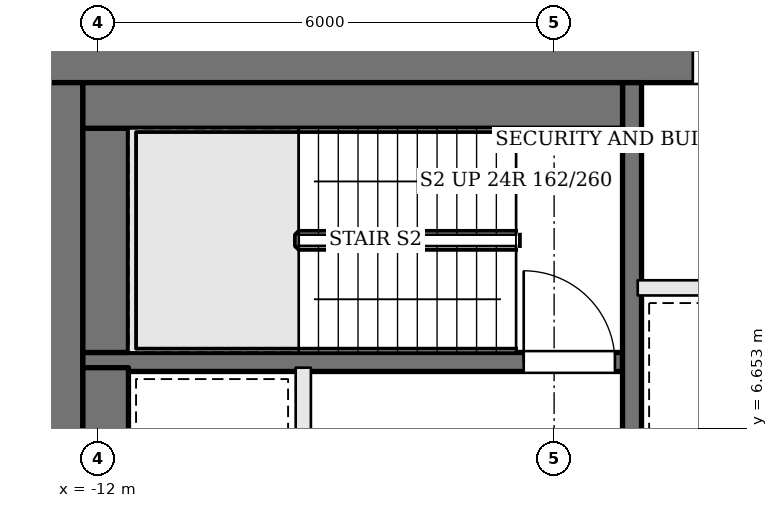
"""IFC4 building model, lengths in metres.
Left out: names, types, materials, properties, quantities, classifications, styles, units other than length and angle.
Written with IfcOpenShell. Run it as: python <this file> out.ifc"""

import sys

from ifc_helpers import new_model, si_unit, direction, frame, frame_2d, origin, place, context, subcontext, project, spatial, rectangle, extrude, element, fill, save


model = new_model("IFC4")
c1 = context("Model", 3, precision=1e-05, world=origin(), true_north=direction((0.0, 1.0)))
c2 = subcontext(c1, "Body", "Model", "MODEL_VIEW")
j1 = project(units=[si_unit("LENGTHUNIT", "METRE"), si_unit("PLANEANGLEUNIT", "RADIAN")], contexts=[c1])
p1 = place(None, origin())
s1 = spatial("IfcSite", under=j1, at=p1, CompositionType="ELEMENT")
p2 = place(p1, origin())
s2 = spatial("IfcBuilding", under=s1, at=p2, CompositionType="ELEMENT")
p3 = place(p2, frame((0.0, 0.0, 256.5)))
s3 = spatial("IfcBuildingStorey", under=s2, at=p3, CompositionType="ELEMENT", Elevation=256.5)
p4 = place(p3, frame((-13.0, 11.6, 0.0), z_axis=(0.0, 0.0, 1.0), x_axis=(1.0, 0.0, 0.0)))
e1 = element("IfcWall", 1, at=p4, inside=s3, PredefinedType="SHEAR", context=c2, shape_type="SweptSolid", body=[
    extrude(rectangle(XDim=26.0, YDim=0.8, at=frame_2d((13.0, 0.0))), origin(), (0.0, 0.0, 1.0), 3.9),
])
p5 = place(p4, frame((8.825, 0.0, 0.0)))
e2 = element("IfcOpeningElement", 2, at=p5, cuts=e1, PredefinedType="OPENING", context=c2, shape_type="SweptSolid", body=[
    extrude(rectangle(XDim=1.0, YDim=2.1, at=frame_2d((0.5, 1.05))), frame((0.0, 0.41, 0.0), z_axis=(0.0, -1.0, 0.0), x_axis=(1.0, 0.0, 0.0)), (0.0, 0.0, 1.0), 0.82),
])
p6 = place(p4, frame((11.825, 0.0, 0.0)))
e3 = element("IfcOpeningElement", 3, at=p6, cuts=e1, PredefinedType="OPENING", context=c2, shape_type="SweptSolid", body=[
    extrude(rectangle(XDim=0.7, YDim=2.1, at=frame_2d((0.35, 1.05))), frame((0.0, 0.41, 0.0), z_axis=(0.0, -1.0, 0.0), x_axis=(1.0, 0.0, 0.0)), (0.0, 0.0, 1.0), 0.82),
])
p7 = place(p4, frame((14.275, 0.0, 0.0)))
e4 = element("IfcOpeningElement", 4, at=p7, cuts=e1, PredefinedType="OPENING", context=c2, shape_type="SweptSolid", body=[
    extrude(rectangle(XDim=0.7, YDim=2.1, at=frame_2d((0.35, 1.05))), frame((0.0, 0.41, 0.0), z_axis=(0.0, -1.0, 0.0), x_axis=(1.0, 0.0, 0.0)), (0.0, 0.0, 1.0), 0.82),
])
p8 = place(p4, frame((16.175, 0.0, 0.0)))
e5 = element("IfcOpeningElement", 5, at=p8, cuts=e1, PredefinedType="OPENING", context=c2, shape_type="SweptSolid", body=[
    extrude(rectangle(XDim=1.0, YDim=2.1, at=frame_2d((0.5, 1.05))), frame((0.0, 0.41, 0.0), z_axis=(0.0, -1.0, 0.0), x_axis=(1.0, 0.0, 0.0)), (0.0, 0.0, 1.0), 0.82),
])
p9 = place(p3, frame((-12.6, -2.2, 0.0), z_axis=(0.0, 0.0, 1.0), x_axis=(0.0, 1.0, 0.0)))
e6 = element("IfcWall", 6, at=p9, inside=s3, PredefinedType="SHEAR", context=c2, shape_type="SweptSolid", body=[
    extrude(rectangle(XDim=13.4, YDim=0.8, at=frame_2d((6.7, 0.0))), origin(), (0.0, 0.0, 1.0), 3.9),
])
p10 = place(p9, frame((4.2, 0.0, 0.0)))
e7 = element("IfcOpeningElement", 7, at=p10, cuts=e6, PredefinedType="OPENING", context=c2, shape_type="SweptSolid", body=[
    extrude(rectangle(XDim=1.8, YDim=2.1, at=frame_2d((0.9, 1.05))), frame((0.0, 0.41, 0.0), z_axis=(0.0, -1.0, 0.0), x_axis=(1.0, 0.0, 0.0)), (0.0, 0.0, 1.0), 0.82),
])
p11 = place(p3, frame((-12.2, 7.525, 0.0), z_axis=(0.0, 0.0, 1.0), x_axis=(1.0, 0.0, 0.0)))
e8 = element("IfcWall", 8, at=p11, inside=s3, PredefinedType="SOLIDWALL", context=c2, shape_type="SweptSolid", body=[
    extrude(rectangle(XDim=7.1, YDim=0.25, at=frame_2d((3.55, 0.0))), origin(), (0.0, 0.0, 1.0), 3.7),
])
p12 = place(p11, frame((5.8, 0.0, 0.0)))
e9 = element("IfcOpeningElement", 9, at=p12, cuts=e8, PredefinedType="OPENING", context=c2, shape_type="SweptSolid", body=[
    extrude(rectangle(XDim=1.2, YDim=2.1, at=frame_2d((0.6, 1.05))), frame((0.0, 0.135, 0.0), z_axis=(0.0, -1.0, 0.0), x_axis=(1.0, 0.0, 0.0)), (0.0, 0.0, 1.0), 0.27),
])
p13 = place(p3, frame((-9.3, 4.45, 0.0), z_axis=(0.0, 0.0, 1.0), x_axis=(0.0, 1.0, 0.0)))
e10 = element("IfcWall", 10, at=p13, inside=s3, PredefinedType="SOLIDWALL", context=c2, shape_type="SweptSolid", body=[
    extrude(rectangle(XDim=3.0, YDim=0.2, at=frame_2d((1.5, 0.0))), origin(), (0.0, 0.0, 1.0), 3.7),
])
p14 = place(p3, frame((-4.975, -2.2, 0.0), z_axis=(0.0, 0.0, 1.0), x_axis=(0.0, 1.0, 0.0)))
e11 = element("IfcWall", 11, at=p14, inside=s3, PredefinedType="SOLIDWALL", context=c2, shape_type="SweptSolid", body=[
    extrude(rectangle(XDim=13.4, YDim=0.25, at=frame_2d((6.7, 0.0))), origin(), (0.0, 0.0, 1.0), 3.7),
])
p15 = place(p14, frame((5.25, 0.0, 0.0)))
e12 = element("IfcOpeningElement", 12, at=p15, cuts=e11, PredefinedType="OPENING", context=c2, shape_type="SweptSolid", body=[
    extrude(rectangle(XDim=1.2, YDim=2.1, at=frame_2d((0.6, 1.05))), frame((0.0, 0.135, 0.0), z_axis=(0.0, -1.0, 0.0), x_axis=(1.0, 0.0, 0.0)), (0.0, 0.0, 1.0), 0.27),
])
p16 = place(p3, frame((-11.9, 4.45, 0.0), z_axis=(0.0, 0.0, 1.0), x_axis=(0.0, 1.0, 0.0)))
e13 = element("IfcWall", 13, at=p16, inside=s3, PredefinedType="SOLIDWALL", context=c2, shape_type="SweptSolid", body=[
    extrude(rectangle(XDim=3.0, YDim=0.6, at=frame_2d((1.5, 0.0))), origin(), (0.0, 0.0, 1.0), 3.7),
])
p17 = place(p3, frame((-11.9, 7.65, 0.0), z_axis=(0.0, 0.0, 1.0), x_axis=(0.0, 1.0, 0.0)))
e14 = element("IfcWall", 14, at=p17, inside=s3, PredefinedType="SOLIDWALL", context=c2, shape_type="SweptSolid", body=[
    extrude(rectangle(XDim=2.95, YDim=0.6, at=frame_2d((1.475, 0.0))), origin(), (0.0, 0.0, 1.0), 3.7),
])
p18 = place(p3, frame((-12.2, 10.9, 0.0), z_axis=(0.0, 0.0, 1.0), x_axis=(1.0, 0.0, 0.0)))
e15 = element("IfcWall", 15, at=p18, inside=s3, PredefinedType="SOLIDWALL", context=c2, shape_type="SweptSolid", body=[
    extrude(rectangle(XDim=7.1, YDim=0.6, at=frame_2d((3.55, 0.0))), origin(), (0.0, 0.0, 1.0), 3.7),
])
p19 = place(p3, frame((-4.9, 8.5, 0.0), z_axis=(0.0, 0.0, 1.0), x_axis=(1.0, 0.0, 0.0)))
e16 = element("IfcWall", 16, at=p19, inside=s3, PredefinedType="SOLIDWALL", context=c2, shape_type="SweptSolid", body=[
    extrude(rectangle(XDim=9.8, YDim=0.2, at=frame_2d((4.9, 0.0))), origin(), (0.0, 0.0, 1.0), 3.7),
])
p20 = place(p12, origin())
e17 = element("IfcDoor", 17, at=p20, inside=s3, OperationType="SINGLE_SWING_LEFT", PredefinedType="DOOR", context=c2, shape_type="SweptSolid", body=[
    extrude(rectangle(XDim=1.2, YDim=2.1, at=frame_2d((0.6, 1.05))), frame((0.0, 0.025, 0.0), z_axis=(0.0, -1.0, 0.0), x_axis=(1.0, 0.0, 0.0)), (0.0, 0.0, 1.0), 0.05),
])
fill(e9, e17)
p21 = place(p5, origin())
e18 = element("IfcDoor", 18, at=p21, inside=s3, OperationType="SINGLE_SWING_LEFT", PredefinedType="DOOR", context=c2, shape_type="SweptSolid", body=[
    extrude(rectangle(XDim=1.0, YDim=2.1, at=frame_2d((0.5, 1.05))), frame((0.0, 0.025, 0.0), z_axis=(0.0, -1.0, 0.0), x_axis=(1.0, 0.0, 0.0)), (0.0, 0.0, 1.0), 0.05),
])
fill(e2, e18)
save(model, sys.argv[1])
